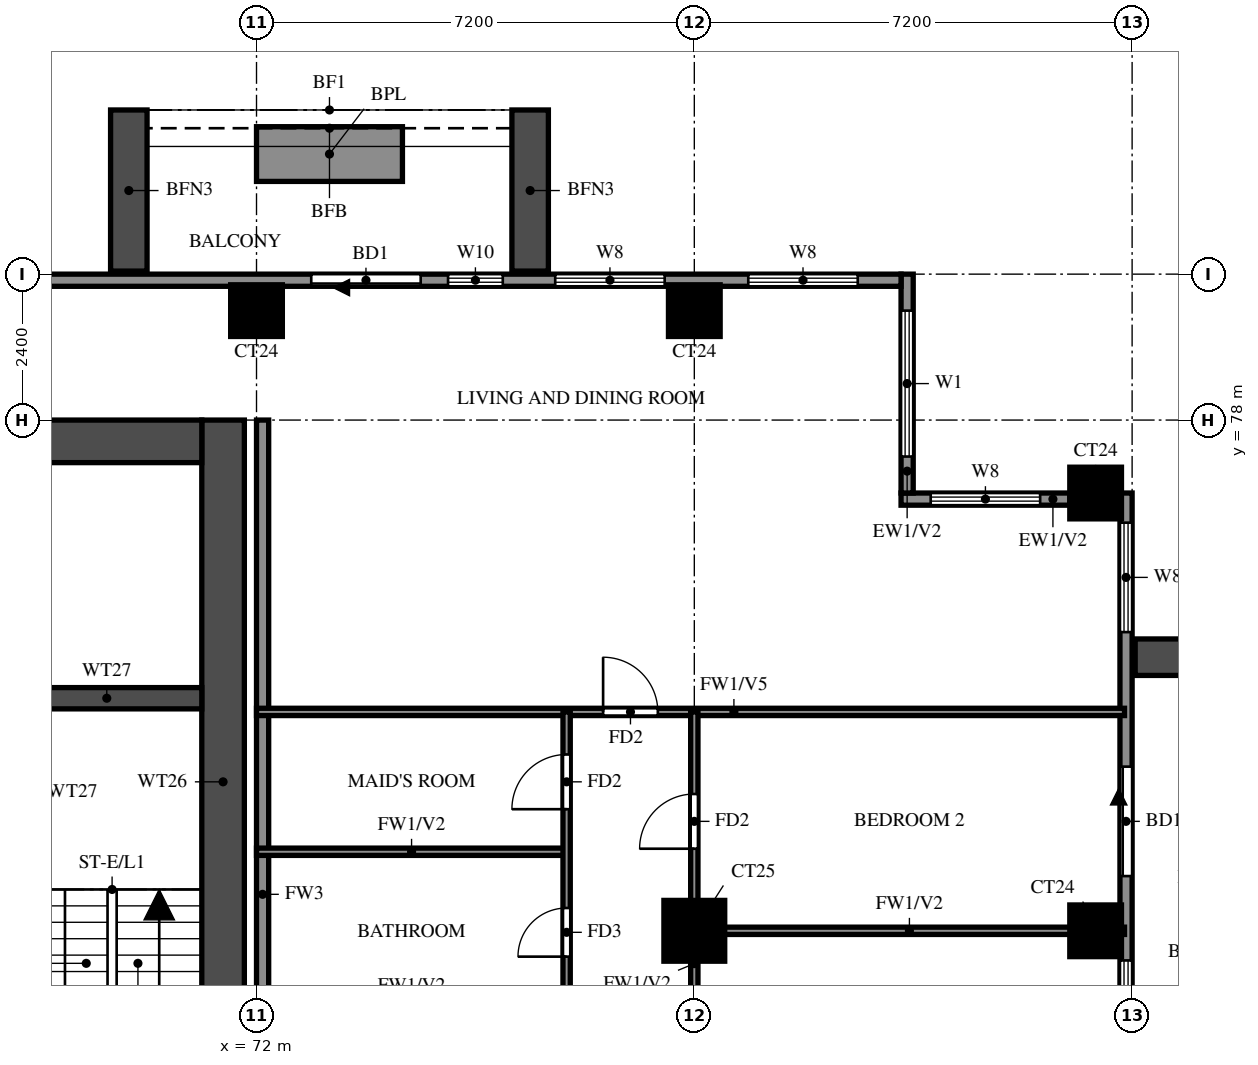
"""IFC4 building model, lengths in metres.
Left out: names, types, materials, properties, quantities, classifications, styles, units other than length and angle.
Written with IfcOpenShell. Run it as: python <this file> out.ifc"""

import sys

from ifc_helpers import new_model, si_unit, direction, frame, frame_2d, origin, origin_2d, place, context, subcontext, project, spatial, rectangle, extrude, source, transform, mapped, element, fill, save


model = new_model("IFC4")
c1 = context("Model", 3, precision=1e-05, world=origin(), true_north=direction((0.0, 1.0)))
c2 = subcontext(c1, "Body", "Model", "MODEL_VIEW")
j1 = project(units=[si_unit("LENGTHUNIT", "METRE"), si_unit("PLANEANGLEUNIT", "RADIAN")], contexts=[c1])
p1 = place(None, origin())
s1 = spatial("IfcSite", under=j1, at=p1, CompositionType="ELEMENT")
p2 = place(p1, origin())
s2 = spatial("IfcBuilding", under=s1, at=p2, CompositionType="ELEMENT")
p3 = place(p2, frame((0.0, 0.0, 143.0)))
s3 = spatial("IfcBuildingStorey", under=s2, at=p3, CompositionType="ELEMENT", Elevation=143.0)
m1 = source(origin(), c2, "Body", "SweptSolid", [
    extrude(rectangle(XDim=1.0, YDim=1.0, at=origin_2d()), origin(), (0.0, 0.0, 1.0), 3.2),
])
p4 = place(p3, frame((79.2, 69.6, 0.0), z_axis=(0.0, 0.0, 1.0), x_axis=(1.0, 0.0, 0.0)))
e1 = element("IfcColumn", 1, at=p4, inside=s3, PredefinedType="COLUMN", context=c2, shape_type="MappedRepresentation", body=[
    mapped(m1, transform((0.0, 0.0, 0.0))),
])
m2 = source(origin(), c2, "Body", "SweptSolid", [
    extrude(rectangle(XDim=0.85, YDim=0.85, at=origin_2d()), origin(), (0.0, 0.0, 1.0), 3.2),
])
for number, where, z_axis, x_axis in (
    (2, (85.8, 69.6, 0.0), (0.0, 0.0, 1.0), (1.0, 0.0, 0.0)),
    (3, (85.8, 76.8, 0.0), (0.0, 0.0, 1.0), (1.0, 0.0, 0.0)),
    (4, (72.0, 79.8, 0.0), (0.0, 0.0, 1.0), (1.0, 0.0, 0.0)),
    (5, (79.2, 79.8, 0.0), (0.0, 0.0, 1.0), (1.0, 0.0, 0.0)),
):
    element("IfcColumn", number, at=place(p3, frame(where, z_axis=z_axis, x_axis=x_axis)), inside=s3, PredefinedType="COLUMN", context=c2, shape_type="MappedRepresentation", body=[
        mapped(m2, transform((0.0, 0.0, 0.0))),
    ])
p5 = place(p3, frame((71.45, 66.1, 0.0), z_axis=(0.0, 0.0, 1.0), x_axis=(0.0, 1.0, 0.0)))
e6 = element("IfcWall", 6, at=p5, inside=s3, PredefinedType="SHEAR", context=c2, shape_type="SweptSolid", body=[
    extrude(rectangle(XDim=11.9, YDim=0.7, at=frame_2d((5.95, 0.0))), origin(), (0.0, 0.0, 1.0), 3.2),
])
p6 = place(p3, frame((29.7, 77.65, 0.0), z_axis=(0.0, 0.0, 1.0), x_axis=(1.0, 0.0, 0.0)))
e7 = element("IfcWall", 7, at=p6, inside=s3, PredefinedType="SHEAR", context=c2, shape_type="SweptSolid", body=[
    extrude(rectangle(XDim=41.4, YDim=0.7, at=frame_2d((20.7, 0.0))), origin(), (0.0, 0.0, 1.0), 3.2),
])
p7 = place(p3, frame((67.975, 73.425, 0.0), z_axis=(0.0, 0.0, 1.0), x_axis=(1.0, 0.0, 0.0)))
e8 = element("IfcWall", 8, at=p7, inside=s3, PredefinedType="SHEAR", context=c2, shape_type="SweptSolid", body=[
    extrude(rectangle(XDim=3.125, YDim=0.35, at=frame_2d((1.562, 0.0))), origin(), (0.0, 0.0, 1.0), 3.2),
])
p8 = place(p3, frame((86.3, 48.2, 0.0), z_axis=(0.0, 0.0, 1.0), x_axis=(0.0, 1.0, 0.0)))
e9 = element("IfcWall", 9, at=p8, inside=s3, PredefinedType="SOLIDWALL", context=c2, shape_type="SweptSolid", body=[
    extrude(rectangle(XDim=28.6, YDim=0.2, at=frame_2d((14.3, 0.0))), origin(), (0.0, 0.0, 1.0), 3.2),
])
p9 = place(p8, frame((7.9, 0.0, 0.0)))
e10 = element("IfcOpeningElement", 10, at=p9, cuts=e9, PredefinedType="OPENING", context=c2, shape_type="SweptSolid", body=[
    extrude(rectangle(XDim=1.8, YDim=2.4, at=frame_2d((0.9, 1.2))), frame((0.0, 0.11, 0.0), z_axis=(0.0, -1.0, 0.0), x_axis=(1.0, 0.0, 0.0)), (0.0, 0.0, 1.0), 0.22),
])
p10 = place(p8, frame((22.3, 0.0, 0.0)))
e11 = element("IfcOpeningElement", 11, at=p10, cuts=e9, PredefinedType="OPENING", context=c2, shape_type="SweptSolid", body=[
    extrude(rectangle(XDim=1.8, YDim=2.4, at=frame_2d((0.9, 1.2))), frame((0.0, 0.11, 0.0), z_axis=(0.0, -1.0, 0.0), x_axis=(1.0, 0.0, 0.0)), (0.0, 0.0, 1.0), 0.22),
])
p11 = place(p8, frame((0.6, 0.0, 0.6)))
e12 = element("IfcOpeningElement", 12, at=p11, cuts=e9, PredefinedType="OPENING", context=c2, shape_type="SweptSolid", body=[
    extrude(rectangle(XDim=2.4, YDim=2.4, at=frame_2d((1.2, 1.2))), frame((0.0, 0.11, 0.0), z_axis=(0.0, -1.0, 0.0), x_axis=(1.0, 0.0, 0.0)), (0.0, 0.0, 1.0), 0.22),
])
p12 = place(p8, frame((3.55, 0.0, 0.6)))
e13 = element("IfcOpeningElement", 13, at=p12, cuts=e9, PredefinedType="OPENING", context=c2, shape_type="SweptSolid", body=[
    extrude(rectangle(XDim=0.9, YDim=2.4, at=frame_2d((0.45, 1.2))), frame((0.0, 0.11, 0.0), z_axis=(0.0, -1.0, 0.0), x_axis=(1.0, 0.0, 0.0)), (0.0, 0.0, 1.0), 0.22),
])
p13 = place(p8, frame((5.312, 0.0, 0.6)))
e14 = element("IfcOpeningElement", 14, at=p13, cuts=e9, PredefinedType="OPENING", context=c2, shape_type="SweptSolid", body=[
    extrude(rectangle(XDim=1.2, YDim=2.4, at=frame_2d((0.6, 1.2))), frame((0.0, 0.11, 0.0), z_axis=(0.0, -1.0, 0.0), x_axis=(1.0, 0.0, 0.0)), (0.0, 0.0, 1.0), 0.22),
])
p14 = place(p8, frame((11.913, 0.0, 0.6)))
e15 = element("IfcOpeningElement", 15, at=p14, cuts=e9, PredefinedType="OPENING", context=c2, shape_type="SweptSolid", body=[
    extrude(rectangle(XDim=1.8, YDim=2.4, at=frame_2d((0.9, 1.2))), frame((0.0, 0.11, 0.0), z_axis=(0.0, -1.0, 0.0), x_axis=(1.0, 0.0, 0.0)), (0.0, 0.0, 1.0), 0.22),
])
p15 = place(p8, frame((15.738, 0.0, 1.5)))
e16 = element("IfcOpeningElement", 16, at=p15, cuts=e9, PredefinedType="OPENING", context=c2, shape_type="SweptSolid", body=[
    extrude(rectangle(XDim=0.9, YDim=0.9, at=frame_2d((0.45, 0.45))), frame((0.0, 0.11, 0.0), z_axis=(0.0, -1.0, 0.0), x_axis=(1.0, 0.0, 0.0)), (0.0, 0.0, 1.0), 0.22),
])
p16 = place(p8, frame((17.95, 0.0, 0.6)))
e17 = element("IfcOpeningElement", 17, at=p16, cuts=e9, PredefinedType="OPENING", context=c2, shape_type="SweptSolid", body=[
    extrude(rectangle(XDim=0.9, YDim=2.4, at=frame_2d((0.45, 1.2))), frame((0.0, 0.11, 0.0), z_axis=(0.0, -1.0, 0.0), x_axis=(1.0, 0.0, 0.0)), (0.0, 0.0, 1.0), 0.22),
])
p17 = place(p8, frame((19.712, 0.0, 0.6)))
e18 = element("IfcOpeningElement", 18, at=p17, cuts=e9, PredefinedType="OPENING", context=c2, shape_type="SweptSolid", body=[
    extrude(rectangle(XDim=1.2, YDim=2.4, at=frame_2d((0.6, 1.2))), frame((0.0, 0.11, 0.0), z_axis=(0.0, -1.0, 0.0), x_axis=(1.0, 0.0, 0.0)), (0.0, 0.0, 1.0), 0.22),
])
p18 = place(p8, frame((26.312, 0.0, 0.6)))
e19 = element("IfcOpeningElement", 19, at=p18, cuts=e9, PredefinedType="OPENING", context=c2, shape_type="SweptSolid", body=[
    extrude(rectangle(XDim=1.8, YDim=2.4, at=frame_2d((0.9, 1.2))), frame((0.0, 0.11, 0.0), z_axis=(0.0, -1.0, 0.0), x_axis=(1.0, 0.0, 0.0)), (0.0, 0.0, 1.0), 0.22),
])
p19 = place(p3, frame((85.375, 76.7, 0.0), z_axis=(0.0, 0.0, 1.0), x_axis=(-1.0, 0.0, 0.0)))
e20 = element("IfcWall", 20, at=p19, inside=s3, PredefinedType="SOLIDWALL", context=c2, shape_type="SweptSolid", body=[
    extrude(rectangle(XDim=2.775, YDim=0.2, at=frame_2d((1.387, 0.0))), origin(), (0.0, 0.0, 1.0), 3.2),
])
p20 = place(p19, frame((0.488, 0.0, 0.6)))
e21 = element("IfcOpeningElement", 21, at=p20, cuts=e20, PredefinedType="OPENING", context=c2, shape_type="SweptSolid", body=[
    extrude(rectangle(XDim=1.8, YDim=2.4, at=frame_2d((0.9, 1.2))), frame((0.0, 0.11, 0.0), z_axis=(0.0, -1.0, 0.0), x_axis=(1.0, 0.0, 0.0)), (0.0, 0.0, 1.0), 0.22),
])
p21 = place(p3, frame((82.7, 76.8, 0.0), z_axis=(0.0, 0.0, 1.0), x_axis=(0.0, 1.0, 0.0)))
e22 = element("IfcWall", 22, at=p21, inside=s3, PredefinedType="SOLIDWALL", context=c2, shape_type="SweptSolid", body=[
    extrude(rectangle(XDim=3.6, YDim=0.2, at=frame_2d((1.8, 0.0))), origin(), (0.0, 0.0, 1.0), 3.2),
])
p22 = place(p21, frame((0.6, 0.0, 0.6)))
e23 = element("IfcOpeningElement", 23, at=p22, cuts=e22, PredefinedType="OPENING", context=c2, shape_type="SweptSolid", body=[
    extrude(rectangle(XDim=2.4, YDim=2.4, at=frame_2d((1.2, 1.2))), frame((0.0, 0.11, 0.0), z_axis=(0.0, -1.0, 0.0), x_axis=(1.0, 0.0, 0.0)), (0.0, 0.0, 1.0), 0.22),
])
p23 = place(p3, frame((82.6, 80.3, 0.0), z_axis=(0.0, 0.0, 1.0), x_axis=(-1.0, 0.0, 0.0)))
e24 = element("IfcWall", 24, at=p23, inside=s3, PredefinedType="SOLIDWALL", context=c2, shape_type="SweptSolid", body=[
    extrude(rectangle(XDim=64.6, YDim=0.2, at=frame_2d((32.3, 0.0))), origin(), (0.0, 0.0, 1.0), 3.2),
])
p24 = place(p23, frame((7.9, 0.0, 0.0)))
e25 = element("IfcOpeningElement", 25, at=p24, cuts=e24, PredefinedType="OPENING", context=c2, shape_type="SweptSolid", body=[
    extrude(rectangle(XDim=1.8, YDim=2.4, at=frame_2d((0.9, 1.2))), frame((0.0, 0.11, 0.0), z_axis=(0.0, -1.0, 0.0), x_axis=(1.0, 0.0, 0.0)), (0.0, 0.0, 1.0), 0.22),
])
p25 = place(p23, frame((54.758, 0.0, 0.6)))
e26 = element("IfcOpeningElement", 26, at=p25, cuts=e24, PredefinedType="OPENING", context=c2, shape_type="SweptSolid", body=[
    extrude(rectangle(XDim=2.4, YDim=2.4, at=frame_2d((1.2, 1.2))), frame((0.0, 0.11, 0.0), z_axis=(0.0, -1.0, 0.0), x_axis=(1.0, 0.0, 0.0)), (0.0, 0.0, 1.0), 0.22),
])
p26 = place(p23, frame((57.642, 0.0, 0.6)))
e27 = element("IfcOpeningElement", 27, at=p26, cuts=e24, PredefinedType="OPENING", context=c2, shape_type="SweptSolid", body=[
    extrude(rectangle(XDim=2.4, YDim=2.4, at=frame_2d((1.2, 1.2))), frame((0.0, 0.11, 0.0), z_axis=(0.0, -1.0, 0.0), x_axis=(1.0, 0.0, 0.0)), (0.0, 0.0, 1.0), 0.22),
])
p27 = place(p23, frame((61.988, 0.0, 0.6)))
e28 = element("IfcOpeningElement", 28, at=p27, cuts=e24, PredefinedType="OPENING", context=c2, shape_type="SweptSolid", body=[
    extrude(rectangle(XDim=1.8, YDim=2.4, at=frame_2d((0.9, 1.2))), frame((0.0, 0.11, 0.0), z_axis=(0.0, -1.0, 0.0), x_axis=(1.0, 0.0, 0.0)), (0.0, 0.0, 1.0), 0.22),
])
p28 = place(p23, frame((0.712, 0.0, 0.6)))
e29 = element("IfcOpeningElement", 29, at=p28, cuts=e24, PredefinedType="OPENING", context=c2, shape_type="SweptSolid", body=[
    extrude(rectangle(XDim=1.8, YDim=2.4, at=frame_2d((0.9, 1.2))), frame((0.0, 0.11, 0.0), z_axis=(0.0, -1.0, 0.0), x_axis=(1.0, 0.0, 0.0)), (0.0, 0.0, 1.0), 0.22),
])
p29 = place(p23, frame((3.887, 0.0, 0.6)))
e30 = element("IfcOpeningElement", 30, at=p29, cuts=e24, PredefinedType="OPENING", context=c2, shape_type="SweptSolid", body=[
    extrude(rectangle(XDim=1.8, YDim=2.4, at=frame_2d((0.9, 1.2))), frame((0.0, 0.11, 0.0), z_axis=(0.0, -1.0, 0.0), x_axis=(1.0, 0.0, 0.0)), (0.0, 0.0, 1.0), 0.22),
])
p30 = place(p23, frame((6.55, 0.0, 0.6)))
e31 = element("IfcOpeningElement", 31, at=p30, cuts=e24, PredefinedType="OPENING", context=c2, shape_type="SweptSolid", body=[
    extrude(rectangle(XDim=0.9, YDim=2.4, at=frame_2d((0.45, 1.2))), frame((0.0, 0.11, 0.0), z_axis=(0.0, -1.0, 0.0), x_axis=(1.0, 0.0, 0.0)), (0.0, 0.0, 1.0), 0.22),
])
for number, where, z_axis, x_axis in (
    (32, (86.45, 74.1, 0.0), (0.0, 0.0, 1.0), (1.0, 0.0, 0.0)),
    (33, (76.5, 80.45, 0.0), (0.0, 0.0, 1.0), (0.0, 1.0, 0.0)),
    (34, (69.9, 80.45, 0.0), (0.0, 0.0, 1.0), (0.0, 1.0, 0.0)),
):
    element("IfcWall", number, at=place(p3, frame(where, z_axis=z_axis, x_axis=x_axis)), inside=s3, PredefinedType="SOLIDWALL", context=c2, shape_type="SweptSolid", body=[
        extrude(rectangle(XDim=2.65, YDim=0.6, at=frame_2d((1.325, 0.0))), origin(), (0.0, 0.0, 1.0), 2.85),
    ])
p31 = place(p3, frame((74.4, 82.375, 0.0), z_axis=(0.0, 0.0, 1.0), x_axis=(-1.0, 0.0, 0.0)))
e35 = element("IfcWall", 35, at=p31, inside=s3, PredefinedType="SOLIDWALL", context=c2, shape_type="SweptSolid", body=[
    extrude(rectangle(XDim=2.4, YDim=0.9, at=frame_2d((1.2, 0.0))), origin(), (0.0, 0.0, 1.0), 0.9),
])
p32 = place(p3, frame((72.1, 62.4, 0.0), z_axis=(0.0, 0.0, 1.0), x_axis=(0.0, 1.0, 0.0)))
e36 = element("IfcWall", 36, at=p32, inside=s3, PredefinedType="SOLIDWALL", context=c2, shape_type="SweptSolid", body=[
    extrude(rectangle(XDim=15.6, YDim=0.2, at=frame_2d((7.8, 0.0))), origin(), (0.0, 0.0, 1.0), 3.2),
])
p33 = place(p3, frame((79.2, 69.6, 0.0), z_axis=(0.0, 0.0, 1.0), x_axis=(1.0, 0.0, 0.0)))
e37 = element("IfcWall", 37, at=p33, inside=s3, PredefinedType="PARTITIONING", context=c2, shape_type="SweptSolid", body=[
    extrude(rectangle(XDim=7.075, YDim=0.12, at=frame_2d((3.538, 0.0))), origin(), (0.0, 0.0, 1.0), 3.2),
])
p34 = place(p3, frame((72.0, 70.9, 0.0), z_axis=(0.0, 0.0, 1.0), x_axis=(1.0, 0.0, 0.0)))
e38 = element("IfcWall", 38, at=p34, inside=s3, PredefinedType="PARTITIONING", context=c2, shape_type="SweptSolid", body=[
    extrude(rectangle(XDim=5.1, YDim=0.12, at=frame_2d((2.55, 0.0))), origin(), (0.0, 0.0, 1.0), 3.2),
])
p35 = place(p3, frame((72.0, 73.2, 0.0), z_axis=(0.0, 0.0, 1.0), x_axis=(1.0, 0.0, 0.0)))
e39 = element("IfcWall", 39, at=p35, inside=s3, PredefinedType="PARTITIONING", context=c2, shape_type="SweptSolid", body=[
    extrude(rectangle(XDim=14.275, YDim=0.12, at=frame_2d((7.137, 0.0))), origin(), (0.0, 0.0, 1.0), 2.3),
])
p36 = place(p35, frame((5.7, 0.0, 0.0)))
e40 = element("IfcOpeningElement", 40, at=p36, cuts=e39, PredefinedType="OPENING", context=c2, shape_type="SweptSolid", body=[
    extrude(rectangle(XDim=0.9, YDim=2.1, at=frame_2d((0.45, 1.05))), frame((0.0, 0.07, 0.0), z_axis=(0.0, -1.0, 0.0), x_axis=(1.0, 0.0, 0.0)), (0.0, 0.0, 1.0), 0.14),
])
p37 = place(p3, frame((77.1, 61.2, 0.0), z_axis=(0.0, 0.0, 1.0), x_axis=(0.0, 1.0, 0.0)))
e41 = element("IfcWall", 41, at=p37, inside=s3, PredefinedType="PARTITIONING", context=c2, shape_type="SweptSolid", body=[
    extrude(rectangle(XDim=12.0, YDim=0.12, at=frame_2d((6.0, 0.0))), origin(), (0.0, 0.0, 1.0), 3.2),
])
p38 = place(p37, frame((5.45, 0.0, 0.0)))
e42 = element("IfcOpeningElement", 42, at=p38, cuts=e41, PredefinedType="OPENING", context=c2, shape_type="SweptSolid", body=[
    extrude(rectangle(XDim=0.8, YDim=2.1, at=frame_2d((0.4, 1.05))), frame((0.0, 0.07, 0.0), z_axis=(0.0, -1.0, 0.0), x_axis=(1.0, 0.0, 0.0)), (0.0, 0.0, 1.0), 0.14),
])
p39 = place(p37, frame((7.975, 0.0, 0.0)))
e43 = element("IfcOpeningElement", 43, at=p39, cuts=e41, PredefinedType="OPENING", context=c2, shape_type="SweptSolid", body=[
    extrude(rectangle(XDim=0.8, YDim=2.1, at=frame_2d((0.4, 1.05))), frame((0.0, 0.07, 0.0), z_axis=(0.0, -1.0, 0.0), x_axis=(1.0, 0.0, 0.0)), (0.0, 0.0, 1.0), 0.14),
])
p40 = place(p37, frame((10.4, 0.0, 0.0)))
e44 = element("IfcOpeningElement", 44, at=p40, cuts=e41, PredefinedType="OPENING", context=c2, shape_type="SweptSolid", body=[
    extrude(rectangle(XDim=0.9, YDim=2.1, at=frame_2d((0.45, 1.05))), frame((0.0, 0.07, 0.0), z_axis=(0.0, -1.0, 0.0), x_axis=(1.0, 0.0, 0.0)), (0.0, 0.0, 1.0), 0.14),
])
p41 = place(p3, frame((79.2, 66.0, 0.0), z_axis=(0.0, 0.0, 1.0), x_axis=(0.0, 1.0, 0.0)))
e45 = element("IfcWall", 45, at=p41, inside=s3, PredefinedType="PARTITIONING", context=c2, shape_type="SweptSolid", body=[
    extrude(rectangle(XDim=7.2, YDim=0.12, at=frame_2d((3.6, 0.0))), origin(), (0.0, 0.0, 1.0), 3.2),
])
p42 = place(p41, frame((1.35, 0.0, 0.0)))
e46 = element("IfcOpeningElement", 46, at=p42, cuts=e45, PredefinedType="OPENING", context=c2, shape_type="SweptSolid", body=[
    extrude(rectangle(XDim=0.9, YDim=2.1, at=frame_2d((0.45, 1.05))), frame((0.0, 0.07, 0.0), z_axis=(0.0, -1.0, 0.0), x_axis=(1.0, 0.0, 0.0)), (0.0, 0.0, 1.0), 0.14),
])
p43 = place(p41, frame((4.95, 0.0, 0.0)))
e47 = element("IfcOpeningElement", 47, at=p43, cuts=e45, PredefinedType="OPENING", context=c2, shape_type="SweptSolid", body=[
    extrude(rectangle(XDim=0.9, YDim=2.1, at=frame_2d((0.45, 1.05))), frame((0.0, 0.07, 0.0), z_axis=(0.0, -1.0, 0.0), x_axis=(1.0, 0.0, 0.0)), (0.0, 0.0, 1.0), 0.14),
])
p44 = place(p10, origin())
e48 = element("IfcDoor", 48, at=p44, inside=s3, OperationType="DOUBLE_DOOR_SLIDING", PredefinedType="DOOR", context=c2, shape_type="SweptSolid", body=[
    extrude(rectangle(XDim=1.8, YDim=2.4, at=frame_2d((0.9, 1.2))), frame((0.0, 0.025, 0.0), z_axis=(0.0, -1.0, 0.0), x_axis=(1.0, 0.0, 0.0)), (0.0, 0.0, 1.0), 0.05),
])
fill(e11, e48)
p45 = place(p17, origin())
e49 = element("IfcWindow", 49, at=p45, inside=s3, PartitioningType="SINGLE_PANEL", PredefinedType="WINDOW", context=c2, shape_type="SweptSolid", body=[
    extrude(rectangle(XDim=1.2, YDim=2.4, at=frame_2d((0.6, 1.2))), frame((0.0, 0.03, 0.0), z_axis=(0.0, -1.0, 0.0), x_axis=(1.0, 0.0, 0.0)), (0.0, 0.0, 1.0), 0.06),
])
fill(e18, e49)
p46 = place(p18, origin())
e50 = element("IfcWindow", 50, at=p46, inside=s3, PartitioningType="DOUBLE_PANEL_VERTICAL", PredefinedType="WINDOW", context=c2, shape_type="SweptSolid", body=[
    extrude(rectangle(XDim=1.8, YDim=2.4, at=frame_2d((0.9, 1.2))), frame((0.0, 0.03, 0.0), z_axis=(0.0, -1.0, 0.0), x_axis=(1.0, 0.0, 0.0)), (0.0, 0.0, 1.0), 0.06),
])
fill(e19, e50)
p47 = place(p20, origin())
e51 = element("IfcWindow", 51, at=p47, inside=s3, PartitioningType="DOUBLE_PANEL_VERTICAL", PredefinedType="WINDOW", context=c2, shape_type="SweptSolid", body=[
    extrude(rectangle(XDim=1.8, YDim=2.4, at=frame_2d((0.9, 1.2))), frame((0.0, 0.03, 0.0), z_axis=(0.0, -1.0, 0.0), x_axis=(1.0, 0.0, 0.0)), (0.0, 0.0, 1.0), 0.06),
])
fill(e21, e51)
p48 = place(p22, origin())
e52 = element("IfcWindow", 52, at=p48, inside=s3, PartitioningType="DOUBLE_PANEL_VERTICAL", PredefinedType="WINDOW", context=c2, shape_type="SweptSolid", body=[
    extrude(rectangle(XDim=2.4, YDim=2.4, at=frame_2d((1.2, 1.2))), frame((0.0, 0.03, 0.0), z_axis=(0.0, -1.0, 0.0), x_axis=(1.0, 0.0, 0.0)), (0.0, 0.0, 1.0), 0.06),
])
fill(e23, e52)
p49 = place(p24, origin())
e53 = element("IfcDoor", 53, at=p49, inside=s3, OperationType="DOUBLE_DOOR_SLIDING", PredefinedType="DOOR", context=c2, shape_type="SweptSolid", body=[
    extrude(rectangle(XDim=1.8, YDim=2.4, at=frame_2d((0.9, 1.2))), frame((0.0, 0.025, 0.0), z_axis=(0.0, -1.0, 0.0), x_axis=(1.0, 0.0, 0.0)), (0.0, 0.0, 1.0), 0.05),
])
fill(e25, e53)
p50 = place(p28, origin())
e54 = element("IfcWindow", 54, at=p50, inside=s3, PartitioningType="DOUBLE_PANEL_VERTICAL", PredefinedType="WINDOW", context=c2, shape_type="SweptSolid", body=[
    extrude(rectangle(XDim=1.8, YDim=2.4, at=frame_2d((0.9, 1.2))), frame((0.0, 0.03, 0.0), z_axis=(0.0, -1.0, 0.0), x_axis=(1.0, 0.0, 0.0)), (0.0, 0.0, 1.0), 0.06),
])
fill(e29, e54)
p51 = place(p29, origin())
e55 = element("IfcWindow", 55, at=p51, inside=s3, PartitioningType="DOUBLE_PANEL_VERTICAL", PredefinedType="WINDOW", context=c2, shape_type="SweptSolid", body=[
    extrude(rectangle(XDim=1.8, YDim=2.4, at=frame_2d((0.9, 1.2))), frame((0.0, 0.03, 0.0), z_axis=(0.0, -1.0, 0.0), x_axis=(1.0, 0.0, 0.0)), (0.0, 0.0, 1.0), 0.06),
])
fill(e30, e55)
p52 = place(p30, origin())
e56 = element("IfcWindow", 56, at=p52, inside=s3, PartitioningType="SINGLE_PANEL", PredefinedType="WINDOW", context=c2, shape_type="SweptSolid", body=[
    extrude(rectangle(XDim=0.9, YDim=2.4, at=frame_2d((0.45, 1.2))), frame((0.0, 0.03, 0.0), z_axis=(0.0, -1.0, 0.0), x_axis=(1.0, 0.0, 0.0)), (0.0, 0.0, 1.0), 0.06),
])
fill(e31, e56)
p53 = place(p43, origin())
e57 = element("IfcDoor", 57, at=p53, inside=s3, OperationType="SINGLE_SWING_LEFT", PredefinedType="DOOR", context=c2, shape_type="SweptSolid", body=[
    extrude(rectangle(XDim=0.9, YDim=2.1, at=frame_2d((0.45, 1.05))), frame((0.0, 0.025, 0.0), z_axis=(0.0, -1.0, 0.0), x_axis=(1.0, 0.0, 0.0)), (0.0, 0.0, 1.0), 0.05),
])
fill(e47, e57)
p54 = place(p36, origin())
e58 = element("IfcDoor", 58, at=p54, inside=s3, OperationType="SINGLE_SWING_RIGHT", PredefinedType="DOOR", context=c2, shape_type="SweptSolid", body=[
    extrude(rectangle(XDim=0.9, YDim=2.1, at=frame_2d((0.45, 1.05))), frame((0.0, 0.025, 0.0), z_axis=(0.0, -1.0, 0.0), x_axis=(1.0, 0.0, 0.0)), (0.0, 0.0, 1.0), 0.05),
])
fill(e40, e58)
p55 = place(p39, origin())
e59 = element("IfcDoor", 59, at=p55, inside=s3, OperationType="SINGLE_SWING_RIGHT", PredefinedType="DOOR", context=c2, shape_type="SweptSolid", body=[
    extrude(rectangle(XDim=0.8, YDim=2.1, at=frame_2d((0.4, 1.05))), frame((0.0, 0.025, 0.0), z_axis=(0.0, -1.0, 0.0), x_axis=(1.0, 0.0, 0.0)), (0.0, 0.0, 1.0), 0.05),
])
fill(e43, e59)
p56 = place(p40, origin())
e60 = element("IfcDoor", 60, at=p56, inside=s3, OperationType="SINGLE_SWING_LEFT", PredefinedType="DOOR", context=c2, shape_type="SweptSolid", body=[
    extrude(rectangle(XDim=0.9, YDim=2.1, at=frame_2d((0.45, 1.05))), frame((0.0, 0.025, 0.0), z_axis=(0.0, -1.0, 0.0), x_axis=(1.0, 0.0, 0.0)), (0.0, 0.0, 1.0), 0.05),
])
fill(e44, e60)
save(model, sys.argv[1])
